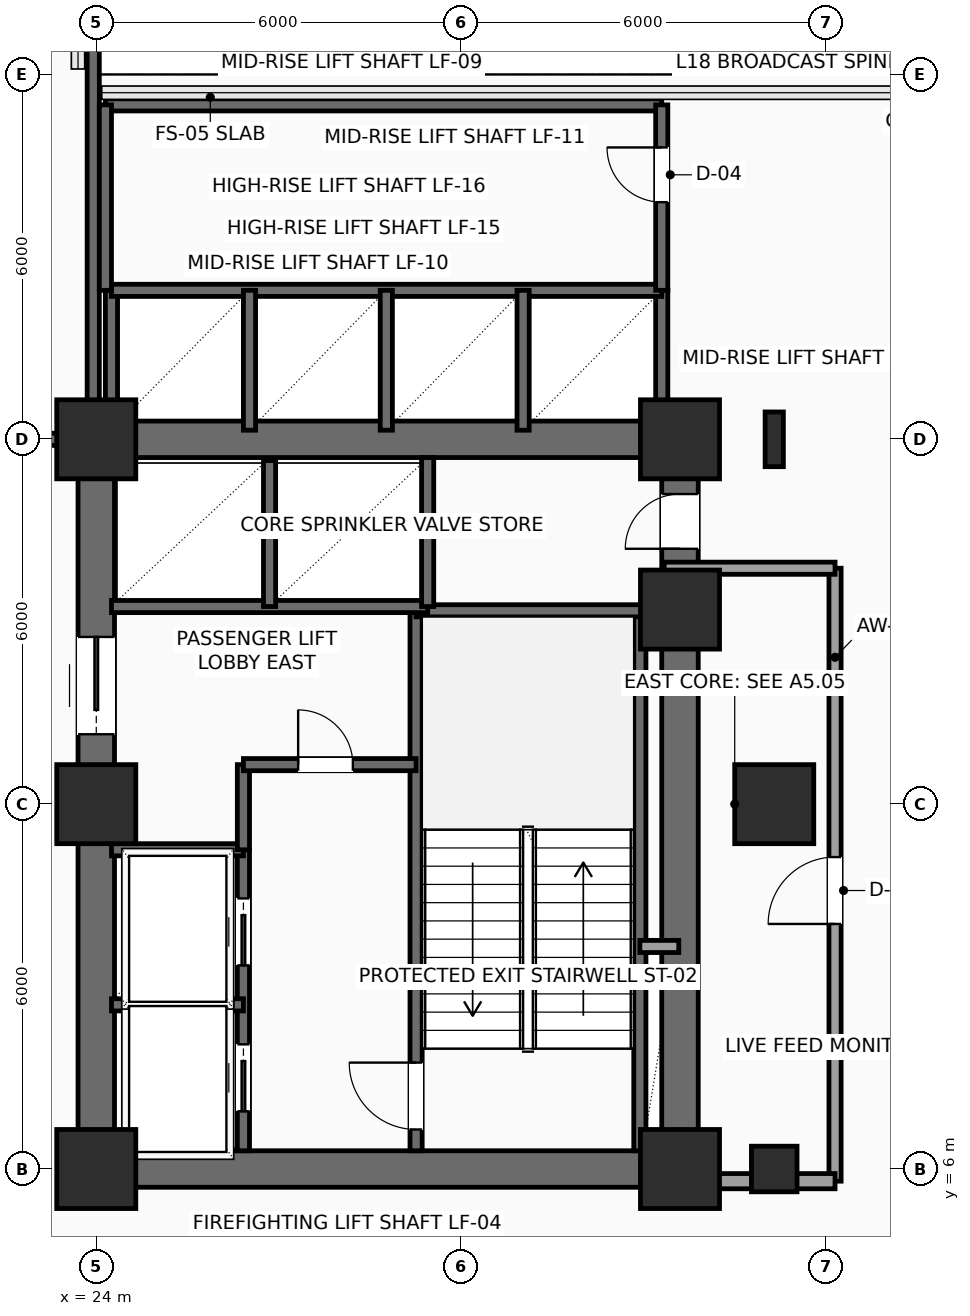
"""IFC4 building model, lengths in metres.
Left out: names, types, materials, properties, quantities, classifications, styles, units other than length and angle.
Written with IfcOpenShell. Run it as: python <this file> out.ifc"""

import sys

from ifc_helpers import new_model, si_unit, direction, frame, frame_2d, origin, origin_2d, place, context, subcontext, project, spatial, rectangle, hollow_rectangle, i_section, extrude, element, fill, save


model = new_model("IFC4")
c1 = context("Model", 3, precision=1e-05, world=origin(), true_north=direction((0.0, 1.0)))
c2 = subcontext(c1, "Body", "Model", "MODEL_VIEW")
j1 = project(units=[si_unit("LENGTHUNIT", "METRE"), si_unit("PLANEANGLEUNIT", "RADIAN")], contexts=[c1])
p1 = place(None, origin())
s1 = spatial("IfcSite", under=j1, at=p1, CompositionType="ELEMENT")
p2 = place(p1, origin())
s2 = spatial("IfcBuilding", under=s1, at=p2, CompositionType="ELEMENT")
p3 = place(p2, frame((0.0, 0.0, 79.2)))
s3 = spatial("IfcBuildingStorey", under=s2, at=p3, CompositionType="ELEMENT", Elevation=79.2)
for number, where, z_axis, x_axis in (
    (1, (24.0, 6.0, 0.0), (0.0, 0.0, 1.0), (1.0, 0.0, 0.0)),
    (2, (24.0, 12.0, 0.0), (0.0, 0.0, 1.0), (1.0, 0.0, 0.0)),
    (3, (24.0, 18.0, 0.0), (0.0, 0.0, 1.0), (1.0, 0.0, 0.0)),
    (4, (33.6, 6.0, 0.0), (0.0, 0.0, 1.0), (1.0, 0.0, 0.0)),
    (5, (33.6, 15.2, 0.0), (0.0, 0.0, 1.0), (1.0, 0.0, 0.0)),
    (6, (33.6, 18.0, 0.0), (0.0, 0.0, 1.0), (1.0, 0.0, 0.0)),
):
    element("IfcColumn", number, at=place(p3, frame(where, z_axis=z_axis, x_axis=x_axis)), inside=s3, PredefinedType="COLUMN", context=c2, shape_type="SweptSolid", body=[
        extrude(rectangle(XDim=1.3, YDim=1.3, at=origin_2d()), origin(), (0.0, 0.0, 1.0), 3.9),
    ])
p4 = place(p3, frame((35.15, 6.0, 0.0), z_axis=(0.0, 0.0, 1.0), x_axis=(1.0, 0.0, 0.0)))
e7 = element("IfcColumn", 7, at=p4, inside=s3, PredefinedType="COLUMN", context=c2, shape_type="SweptSolid", body=[
    extrude(hollow_rectangle(XDim=0.75, YDim=0.75, WallThickness=0.035, InnerFilletRadius=0.035, OuterFilletRadius=0.05, at=origin_2d()), origin(), (0.0, 0.0, 1.0), 3.9),
])
p5 = place(p3, frame((35.15, 12.0, 0.0), z_axis=(0.0, 0.0, 1.0), x_axis=(1.0, 0.0, 0.0)))
e8 = element("IfcColumn", 8, at=p5, inside=s3, PredefinedType="COLUMN", context=c2, shape_type="SweptSolid", body=[
    extrude(rectangle(XDim=1.3, YDim=1.3, at=origin_2d()), origin(), (0.0, 0.0, 1.0), 3.9),
])
p6 = place(p3, frame((35.15, 18.0, 0.0), z_axis=(0.0, 0.0, 1.0), x_axis=(1.0, 0.0, 0.0)))
e9 = element("IfcColumn", 9, at=p6, inside=s3, PredefinedType="COLUMN", context=c2, shape_type="SweptSolid", body=[
    extrude(i_section(OverallWidth=0.3, OverallDepth=0.9, WebThickness=0.019, FlangeThickness=0.035, FilletRadius=0.03, at=origin_2d()), origin(), (0.0, 0.0, 1.0), 3.9),
])
for number, where, z_axis, x_axis in (
    (10, (24.0, 6.0, 0.0), (0.0, 0.0, 1.0), (1.0, 0.0, 0.0)),
    (11, (24.0, 18.0, 0.0), (0.0, 0.0, 1.0), (1.0, 0.0, 0.0)),
):
    element("IfcWall", number, at=place(p3, frame(where, z_axis=z_axis, x_axis=x_axis)), inside=s3, PredefinedType="SHEAR", context=c2, shape_type="SweptSolid", body=[
        extrude(rectangle(XDim=9.6, YDim=0.6, at=frame_2d((4.8, 0.0))), origin(), (0.0, 0.0, 1.0), 3.65),
    ])
p7 = place(p3, frame((24.0, 6.0, 0.0), z_axis=(0.0, 0.0, 1.0), x_axis=(0.0, 1.0, 0.0)))
e12 = element("IfcWall", 12, at=p7, inside=s3, PredefinedType="SHEAR", context=c2, shape_type="SweptSolid", body=[
    extrude(rectangle(XDim=12.0, YDim=0.6, at=frame_2d((6.0, 0.0))), origin(), (0.0, 0.0, 1.0), 3.65),
])
p8 = place(p7, frame((7.15, 0.0, 0.0)))
e13 = element("IfcOpeningElement", 13, at=p8, cuts=e12, PredefinedType="OPENING", context=c2, shape_type="SweptSolid", body=[
    extrude(rectangle(XDim=1.6, YDim=2.3, at=frame_2d((0.8, 1.15))), frame((0.0, 0.31, 0.0), z_axis=(0.0, -1.0, 0.0), x_axis=(1.0, 0.0, 0.0)), (0.0, 0.0, 1.0), 0.62),
])
p9 = place(p3, frame((33.6, 6.0, 0.0), z_axis=(0.0, 0.0, 1.0), x_axis=(0.0, 1.0, 0.0)))
e14 = element("IfcWall", 14, at=p9, inside=s3, PredefinedType="SHEAR", context=c2, shape_type="SweptSolid", body=[
    extrude(rectangle(XDim=12.0, YDim=0.6, at=frame_2d((6.0, 0.0))), origin(), (0.0, 0.0, 1.0), 3.65),
])
p10 = place(p9, frame((10.2, 0.0, 0.0)))
e15 = element("IfcOpeningElement", 15, at=p10, cuts=e14, PredefinedType="OPENING", context=c2, shape_type="SweptSolid", body=[
    extrude(rectangle(XDim=0.9, YDim=2.15, at=frame_2d((0.45, 1.075))), frame((0.0, 0.31, 0.0), z_axis=(0.0, -1.0, 0.0), x_axis=(1.0, 0.0, 0.0)), (0.0, 0.0, 1.0), 0.62),
])
p11 = place(p3, frame((29.26, 6.3, 0.0), z_axis=(0.0, 0.0, 1.0), x_axis=(0.0, 1.0, 0.0)))
e16 = element("IfcWall", 16, at=p11, inside=s3, PredefinedType="SHEAR", context=c2, shape_type="SweptSolid", body=[
    extrude(rectangle(XDim=8.88, YDim=0.2, at=frame_2d((4.44, 0.0))), origin(), (0.0, 0.0, 1.0), 3.65),
])
p12 = place(p11, frame((0.35, 0.0, 0.0)))
e17 = element("IfcOpeningElement", 17, at=p12, cuts=e16, PredefinedType="OPENING", context=c2, shape_type="SweptSolid", body=[
    extrude(rectangle(XDim=1.1, YDim=2.2, at=frame_2d((0.55, 1.1))), frame((0.0, 0.11, 0.0), z_axis=(0.0, -1.0, 0.0), x_axis=(1.0, 0.0, 0.0)), (0.0, 0.0, 1.0), 0.22),
])
p13 = place(p3, frame((32.94, 6.3, 0.0), z_axis=(0.0, 0.0, 1.0), x_axis=(0.0, 1.0, 0.0)))
e18 = element("IfcWall", 18, at=p13, inside=s3, PredefinedType="SHEAR", context=c2, shape_type="SweptSolid", body=[
    extrude(rectangle(XDim=8.88, YDim=0.2, at=frame_2d((4.44, 0.0))), origin(), (0.0, 0.0, 1.0), 3.65),
])
p14 = place(p3, frame((29.26, 15.18, 0.0), z_axis=(0.0, 0.0, 1.0), x_axis=(1.0, 0.0, 0.0)))
e19 = element("IfcWall", 19, at=p14, inside=s3, PredefinedType="SHEAR", context=c2, shape_type="SweptSolid", body=[
    extrude(rectangle(XDim=4.04, YDim=0.2, at=frame_2d((2.02, 0.0))), origin(), (0.0, 0.0, 1.0), 3.65),
])
p15 = place(p3, frame((26.42, 6.3, 0.0), z_axis=(0.0, 0.0, 1.0), x_axis=(0.0, 1.0, 0.0)))
e20 = element("IfcWall", 20, at=p15, inside=s3, PredefinedType="SHEAR", context=c2, shape_type="SweptSolid", body=[
    extrude(rectangle(XDim=4.95, YDim=0.2, at=frame_2d((2.475, 0.0))), origin(), (0.0, 0.0, 1.0), 3.65),
])
p16 = place(p15, frame((0.65, 0.0, 0.0)))
e21 = element("IfcOpeningElement", 21, at=p16, cuts=e20, PredefinedType="OPENING", context=c2, shape_type="SweptSolid", body=[
    extrude(rectangle(XDim=1.1, YDim=2.2, at=frame_2d((0.55, 1.1))), frame((0.0, 0.11, 0.0), z_axis=(0.0, -1.0, 0.0), x_axis=(1.0, 0.0, 0.0)), (0.0, 0.0, 1.0), 0.22),
])
p17 = place(p15, frame((3.05, 0.0, 0.0)))
e22 = element("IfcOpeningElement", 22, at=p17, cuts=e20, PredefinedType="OPENING", context=c2, shape_type="SweptSolid", body=[
    extrude(rectangle(XDim=1.1, YDim=2.2, at=frame_2d((0.55, 1.1))), frame((0.0, 0.11, 0.0), z_axis=(0.0, -1.0, 0.0), x_axis=(1.0, 0.0, 0.0)), (0.0, 0.0, 1.0), 0.22),
])
for number, where, z_axis, x_axis in (
    (23, (24.25, 8.7, 0.0), (0.0, 0.0, 1.0), (1.0, 0.0, 0.0)),
    (24, (24.25, 11.25, 0.0), (0.0, 0.0, 1.0), (1.0, 0.0, 0.0)),
):
    element("IfcWall", number, at=place(p3, frame(where, z_axis=z_axis, x_axis=x_axis)), inside=s3, PredefinedType="SHEAR", context=c2, shape_type="SweptSolid", body=[
        extrude(rectangle(XDim=2.17, YDim=0.2, at=frame_2d((1.085, 0.0))), origin(), (0.0, 0.0, 1.0), 3.65),
    ])
p18 = place(p3, frame((26.42, 11.25, 0.0), z_axis=(0.0, 0.0, 1.0), x_axis=(0.0, 1.0, 0.0)))
e25 = element("IfcWall", 25, at=p18, inside=s3, PredefinedType="SHEAR", context=c2, shape_type="SweptSolid", body=[
    extrude(rectangle(XDim=1.4, YDim=0.2, at=frame_2d((0.7, 0.0))), origin(), (0.0, 0.0, 1.0), 3.65),
])
p19 = place(p3, frame((26.42, 12.65, 0.0), z_axis=(0.0, 0.0, 1.0), x_axis=(1.0, 0.0, 0.0)))
e26 = element("IfcWall", 26, at=p19, inside=s3, PredefinedType="SHEAR", context=c2, shape_type="SweptSolid", body=[
    extrude(rectangle(XDim=2.84, YDim=0.2, at=frame_2d((1.42, 0.0))), origin(), (0.0, 0.0, 1.0), 3.65),
])
p20 = place(p19, frame((0.9, 0.0, 0.0)))
e27 = element("IfcOpeningElement", 27, at=p20, cuts=e26, PredefinedType="OPENING", context=c2, shape_type="SweptSolid", body=[
    extrude(rectangle(XDim=0.9, YDim=2.15, at=frame_2d((0.45, 1.075))), frame((0.0, 0.11, 0.0), z_axis=(0.0, -1.0, 0.0), x_axis=(1.0, 0.0, 0.0)), (0.0, 0.0, 1.0), 0.22),
])
p21 = place(p3, frame((32.94, 9.66, 0.0), z_axis=(0.0, 0.0, 1.0), x_axis=(1.0, 0.0, 0.0)))
e28 = element("IfcWall", 28, at=p21, inside=s3, PredefinedType="SOLIDWALL", context=c2, shape_type="SweptSolid", body=[
    extrude(rectangle(XDim=0.64, YDim=0.2, at=frame_2d((0.32, 0.0))), origin(), (0.0, 0.0, 1.0), 3.65),
])
p22 = place(p3, frame((24.25, 15.25, 0.0), z_axis=(0.0, 0.0, 1.0), x_axis=(1.0, 0.0, 0.0)))
e29 = element("IfcWall", 29, at=p22, inside=s3, PredefinedType="SHEAR", context=c2, shape_type="SweptSolid", body=[
    extrude(rectangle(XDim=5.2, YDim=0.2, at=frame_2d((2.6, 0.0))), origin(), (0.0, 0.0, 1.0), 3.65),
])
p23 = place(p3, frame((26.85, 15.25, 0.0), z_axis=(0.0, 0.0, 1.0), x_axis=(0.0, 1.0, 0.0)))
e30 = element("IfcWall", 30, at=p23, inside=s3, PredefinedType="SHEAR", context=c2, shape_type="SweptSolid", body=[
    extrude(rectangle(XDim=2.4, YDim=0.2, at=frame_2d((1.2, 0.0))), origin(), (0.0, 0.0, 1.0), 3.65),
])
p24 = place(p3, frame((29.45, 15.25, 0.0), z_axis=(0.0, 0.0, 1.0), x_axis=(0.0, 1.0, 0.0)))
e31 = element("IfcWall", 31, at=p24, inside=s3, PredefinedType="SHEAR", context=c2, shape_type="SweptSolid", body=[
    extrude(rectangle(XDim=2.45, YDim=0.2, at=frame_2d((1.225, 0.0))), origin(), (0.0, 0.0, 1.0), 3.65),
])
p25 = place(p3, frame((20.45, 18.0, 0.0), z_axis=(0.0, 0.0, 1.0), x_axis=(1.0, 0.0, 0.0)))
e32 = element("IfcWall", 32, at=p25, inside=s3, PredefinedType="SHEAR", context=c2, shape_type="SweptSolid", body=[
    extrude(rectangle(XDim=3.5, YDim=0.2, at=frame_2d((1.75, 0.0))), origin(), (0.0, 0.0, 1.0), 3.65),
])
p26 = place(p25, frame((0.95, 0.0, 0.0)))
e33 = element("IfcOpeningElement", 33, at=p26, cuts=e32, PredefinedType="OPENING", context=c2, shape_type="SweptSolid", body=[
    extrude(rectangle(XDim=1.6, YDim=2.3, at=frame_2d((0.8, 1.15))), frame((0.0, 0.11, 0.0), z_axis=(0.0, -1.0, 0.0), x_axis=(1.0, 0.0, 0.0)), (0.0, 0.0, 1.0), 0.22),
])
p27 = place(p3, frame((23.95, 18.0, 0.0), z_axis=(0.0, 0.0, 1.0), x_axis=(0.0, 1.0, 0.0)))
e34 = element("IfcWall", 34, at=p27, inside=s3, PredefinedType="SHEAR", context=c2, shape_type="SweptSolid", body=[
    extrude(rectangle(XDim=9.3, YDim=0.2, at=frame_2d((4.65, 0.0))), origin(), (0.0, 0.0, 1.0), 3.65),
])
for number, where, z_axis, x_axis in (
    (35, (33.3, 18.1, 0.0), (0.0, 0.0, 1.0), (0.0, 1.0, 0.0)),
    (36, (24.25, 18.1, 0.0), (0.0, 0.0, 1.0), (0.0, 1.0, 0.0)),
):
    element("IfcWall", number, at=place(p3, frame(where, z_axis=z_axis, x_axis=x_axis)), inside=s3, PredefinedType="SHEAR", context=c2, shape_type="SweptSolid", body=[
        extrude(rectangle(XDim=2.35, YDim=0.2, at=frame_2d((1.175, 0.0))), origin(), (0.0, 0.0, 1.0), 3.65),
    ])
p28 = place(p3, frame((24.25, 20.45, 0.0), z_axis=(0.0, 0.0, 1.0), x_axis=(1.0, 0.0, 0.0)))
e37 = element("IfcWall", 37, at=p28, inside=s3, PredefinedType="SHEAR", context=c2, shape_type="SweptSolid", body=[
    extrude(rectangle(XDim=9.05, YDim=0.2, at=frame_2d((4.525, 0.0))), origin(), (0.0, 0.0, 1.0), 3.65),
])
for number, where, z_axis, x_axis in (
    (38, (26.52, 18.15, 0.0), (0.0, 0.0, 1.0), (0.0, 1.0, 0.0)),
    (39, (28.77, 18.15, 0.0), (0.0, 0.0, 1.0), (0.0, 1.0, 0.0)),
    (40, (31.02, 18.15, 0.0), (0.0, 0.0, 1.0), (0.0, 1.0, 0.0)),
):
    element("IfcWall", number, at=place(p3, frame(where, z_axis=z_axis, x_axis=x_axis)), inside=s3, PredefinedType="SHEAR", context=c2, shape_type="SweptSolid", body=[
        extrude(rectangle(XDim=2.3, YDim=0.2, at=frame_2d((1.15, 0.0))), origin(), (0.0, 0.0, 1.0), 3.65),
    ])
p29 = place(p3, frame((24.15, 23.5, 0.0), z_axis=(0.0, 0.0, 1.0), x_axis=(1.0, 0.0, 0.0)))
e41 = element("IfcWall", 41, at=p29, inside=s3, PredefinedType="SHEAR", context=c2, shape_type="SweptSolid", body=[
    extrude(rectangle(XDim=9.15, YDim=0.2, at=frame_2d((4.575, 0.0))), origin(), (0.0, 0.0, 1.0), 3.65),
])
p30 = place(p3, frame((33.3, 20.45, 0.0), z_axis=(0.0, 0.0, 1.0), x_axis=(0.0, 1.0, 0.0)))
e42 = element("IfcWall", 42, at=p30, inside=s3, PredefinedType="SHEAR", context=c2, shape_type="SweptSolid", body=[
    extrude(rectangle(XDim=3.05, YDim=0.2, at=frame_2d((1.525, 0.0))), origin(), (0.0, 0.0, 1.0), 3.65),
])
p31 = place(p30, frame((1.45, 0.0, 0.0)))
e43 = element("IfcOpeningElement", 43, at=p31, cuts=e42, PredefinedType="OPENING", context=c2, shape_type="SweptSolid", body=[
    extrude(rectangle(XDim=0.9, YDim=2.15, at=frame_2d((0.45, 1.075))), frame((0.0, 0.11, 0.0), z_axis=(0.0, -1.0, 0.0), x_axis=(1.0, 0.0, 0.0)), (0.0, 0.0, 1.0), 0.22),
])
p32 = place(p3, frame((24.15, 20.45, 0.0), z_axis=(0.0, 0.0, 1.0), x_axis=(0.0, 1.0, 0.0)))
e44 = element("IfcWall", 44, at=p32, inside=s3, PredefinedType="SHEAR", context=c2, shape_type="SweptSolid", body=[
    extrude(rectangle(XDim=3.05, YDim=0.2, at=frame_2d((1.525, 0.0))), origin(), (0.0, 0.0, 1.0), 3.65),
])
p33 = place(p3, frame((36.15, 5.8, 0.0), z_axis=(0.0, 0.0, 1.0), x_axis=(0.0, 1.0, 0.0)))
e45 = element("IfcWall", 45, at=p33, inside=s3, PredefinedType="PARTITIONING", context=c2, shape_type="SweptSolid", body=[
    extrude(rectangle(XDim=10.08, YDim=0.2, at=frame_2d((5.04, 0.0))), origin(), (0.0, 0.0, 1.0), 3.65),
])
p34 = place(p33, frame((4.23, 0.0, 0.0)))
e46 = element("IfcOpeningElement", 46, at=p34, cuts=e45, PredefinedType="OPENING", context=c2, shape_type="SweptSolid", body=[
    extrude(rectangle(XDim=1.1, YDim=2.25, at=frame_2d((0.55, 1.125))), frame((0.0, 0.11, 0.0), z_axis=(0.0, -1.0, 0.0), x_axis=(1.0, 0.0, 0.0)), (0.0, 0.0, 1.0), 0.22),
])
p35 = place(p3, frame((36.15, 15.88, 0.0), z_axis=(0.0, 0.0, 1.0), x_axis=(-1.0, 0.0, 0.0)))
e47 = element("IfcWall", 47, at=p35, inside=s3, PredefinedType="PARTITIONING", context=c2, shape_type="SweptSolid", body=[
    extrude(rectangle(XDim=2.81, YDim=0.2, at=frame_2d((1.405, 0.0))), origin(), (0.0, 0.0, 1.0), 3.65),
])
p36 = place(p3, frame((33.65, 5.8, 0.0), z_axis=(0.0, 0.0, 1.0), x_axis=(1.0, 0.0, 0.0)))
e48 = element("IfcWall", 48, at=p36, inside=s3, PredefinedType="PARTITIONING", context=c2, shape_type="SweptSolid", body=[
    extrude(rectangle(XDim=2.5, YDim=0.25, at=frame_2d((1.25, 0.0))), origin(), (0.0, 0.0, 1.0), 2.992),
])
p37 = place(p8, origin())
e49 = element("IfcDoor", 49, at=p37, inside=s3, OperationType="DOUBLE_DOOR_SLIDING", PredefinedType="DOOR", context=c2, shape_type="SweptSolid", body=[
    extrude(rectangle(XDim=1.6, YDim=2.3, at=frame_2d((0.8, 1.15))), frame((0.0, 0.025, 0.0), z_axis=(0.0, -1.0, 0.0), x_axis=(1.0, 0.0, 0.0)), (0.0, 0.0, 1.0), 0.05),
])
fill(e13, e49)
p38 = place(p10, origin())
e50 = element("IfcDoor", 50, at=p38, inside=s3, OperationType="SINGLE_SWING_LEFT", PredefinedType="DOOR", context=c2, shape_type="SweptSolid", body=[
    extrude(rectangle(XDim=0.9, YDim=2.15, at=frame_2d((0.45, 1.075))), frame((0.0, 0.025, 0.0), z_axis=(0.0, -1.0, 0.0), x_axis=(1.0, 0.0, 0.0)), (0.0, 0.0, 1.0), 0.05),
])
fill(e15, e50)
p39 = place(p12, origin())
e51 = element("IfcDoor", 51, at=p39, inside=s3, OperationType="SINGLE_SWING_RIGHT", PredefinedType="DOOR", context=c2, shape_type="SweptSolid", body=[
    extrude(rectangle(XDim=1.1, YDim=2.2, at=frame_2d((0.55, 1.1))), frame((0.0, 0.025, 0.0), z_axis=(0.0, -1.0, 0.0), x_axis=(1.0, 0.0, 0.0)), (0.0, 0.0, 1.0), 0.05),
])
fill(e17, e51)
p40 = place(p16, origin())
e52 = element("IfcDoor", 52, at=p40, inside=s3, OperationType="SLIDING_TO_LEFT", PredefinedType="DOOR", context=c2, shape_type="SweptSolid", body=[
    extrude(rectangle(XDim=1.1, YDim=2.2, at=frame_2d((0.55, 1.1))), frame((0.0, 0.025, 0.0), z_axis=(0.0, -1.0, 0.0), x_axis=(1.0, 0.0, 0.0)), (0.0, 0.0, 1.0), 0.05),
])
fill(e21, e52)
p41 = place(p17, origin())
e53 = element("IfcDoor", 53, at=p41, inside=s3, OperationType="SLIDING_TO_LEFT", PredefinedType="DOOR", context=c2, shape_type="SweptSolid", body=[
    extrude(rectangle(XDim=1.1, YDim=2.2, at=frame_2d((0.55, 1.1))), frame((0.0, 0.025, 0.0), z_axis=(0.0, -1.0, 0.0), x_axis=(1.0, 0.0, 0.0)), (0.0, 0.0, 1.0), 0.05),
])
fill(e22, e53)
p42 = place(p20, origin())
e54 = element("IfcDoor", 54, at=p42, inside=s3, OperationType="SINGLE_SWING_LEFT", PredefinedType="DOOR", context=c2, shape_type="SweptSolid", body=[
    extrude(rectangle(XDim=0.9, YDim=2.15, at=frame_2d((0.45, 1.075))), frame((0.0, 0.025, 0.0), z_axis=(0.0, -1.0, 0.0), x_axis=(1.0, 0.0, 0.0)), (0.0, 0.0, 1.0), 0.05),
])
fill(e27, e54)
p43 = place(p31, origin())
e55 = element("IfcDoor", 55, at=p43, inside=s3, OperationType="SINGLE_SWING_RIGHT", PredefinedType="DOOR", context=c2, shape_type="SweptSolid", body=[
    extrude(rectangle(XDim=0.9, YDim=2.15, at=frame_2d((0.45, 1.075))), frame((0.0, 0.025, 0.0), z_axis=(0.0, -1.0, 0.0), x_axis=(1.0, 0.0, 0.0)), (0.0, 0.0, 1.0), 0.05),
])
fill(e43, e55)
p44 = place(p34, origin())
e56 = element("IfcDoor", 56, at=p44, inside=s3, OperationType="SINGLE_SWING_LEFT", PredefinedType="DOOR", context=c2, shape_type="SweptSolid", body=[
    extrude(rectangle(XDim=1.1, YDim=2.25, at=frame_2d((0.55, 1.125))), frame((0.0, 0.025, 0.0), z_axis=(0.0, -1.0, 0.0), x_axis=(1.0, 0.0, 0.0)), (0.0, 0.0, 1.0), 0.05),
])
fill(e46, e56)
save(model, sys.argv[1])
